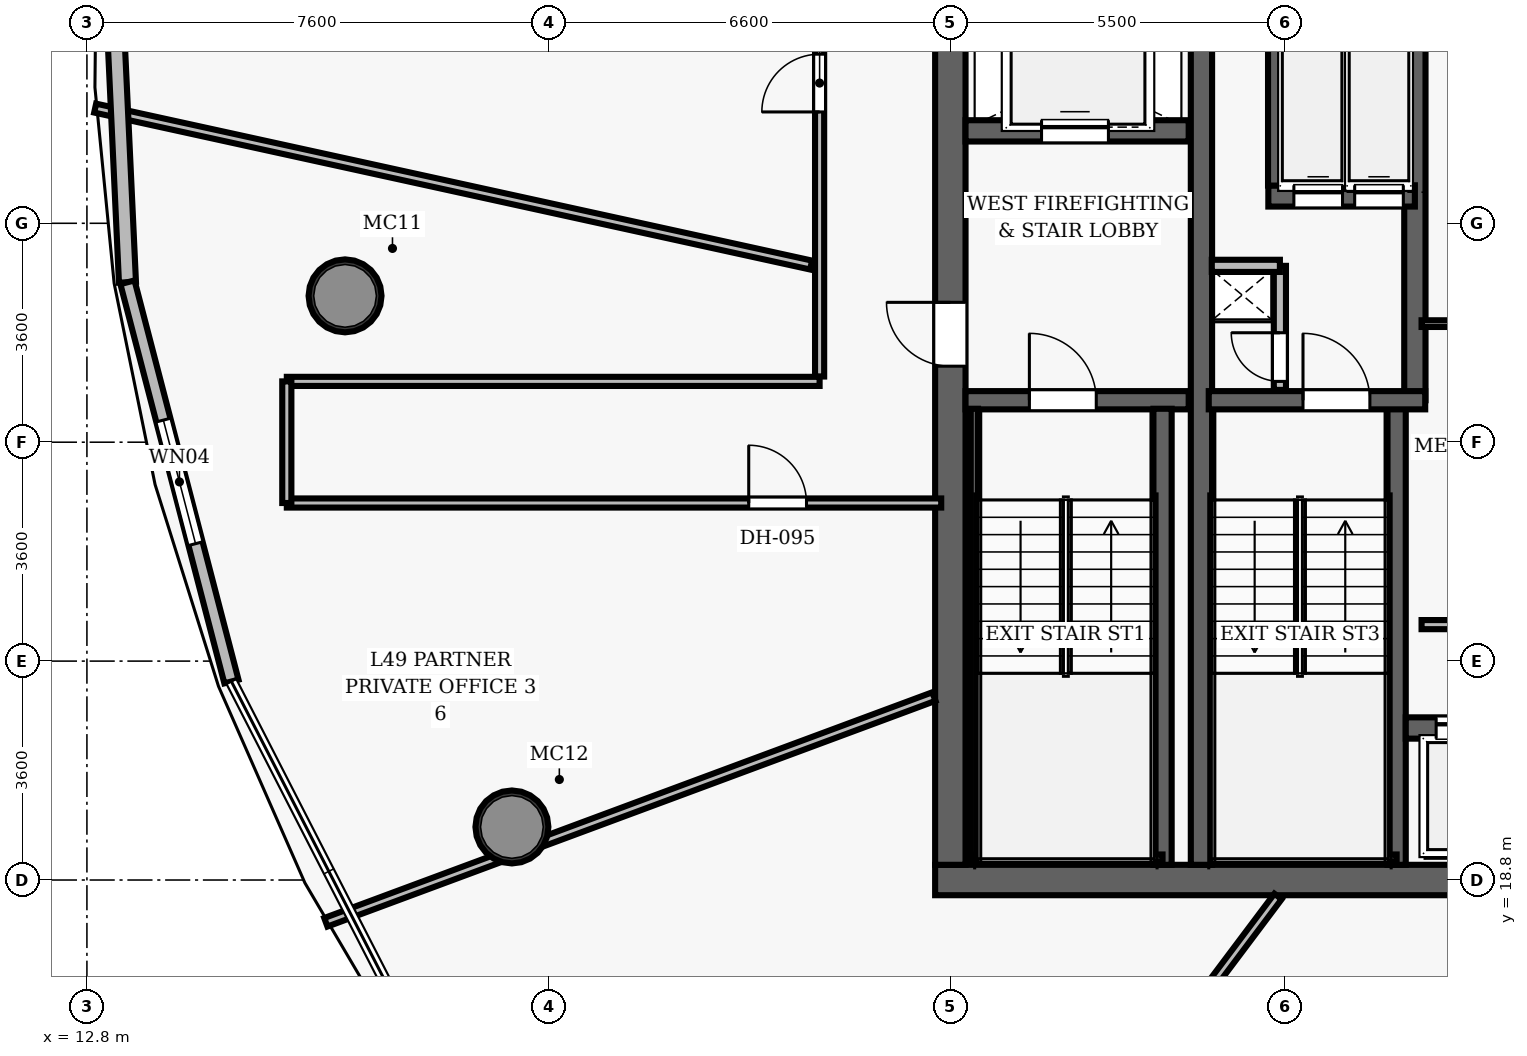
"""IFC4 building model, lengths in metres.
Left out: names, types, materials, properties, quantities, classifications, styles, units other than length and angle.
Written with IfcOpenShell. Run it as: python <this file> out.ifc"""

import sys

from ifc_helpers import new_model, si_unit, direction, frame, frame_2d, origin, origin_2d, place, context, subcontext, project, spatial, rectangle, hollow_circle, extrude, element, fill, save


model = new_model("IFC4")
c1 = context("Model", 3, precision=1e-05, world=origin(), true_north=direction((0.0, 1.0)))
c2 = subcontext(c1, "Body", "Model", "MODEL_VIEW")
j1 = project(units=[si_unit("LENGTHUNIT", "METRE"), si_unit("PLANEANGLEUNIT", "RADIAN")], contexts=[c1])
p1 = place(None, origin())
s1 = spatial("IfcSite", under=j1, at=p1, CompositionType="ELEMENT")
p2 = place(p1, origin())
s2 = spatial("IfcBuilding", under=s1, at=p2, CompositionType="ELEMENT")
p3 = place(p2, frame((0.0, 0.0, 194.3)))
s3 = spatial("IfcBuildingStorey", under=s2, at=p3, CompositionType="ELEMENT", Elevation=194.3)
p4 = place(p3, frame((26.75, 18.8, 0.0), z_axis=(0.0, 0.0, 1.0), x_axis=(1.0, 0.0, 0.0)))
e1 = element("IfcWall", 1, at=p4, inside=s3, PredefinedType="SHEAR", context=c2, shape_type="SweptSolid", body=[
    extrude(rectangle(XDim=22.5, YDim=0.5, at=frame_2d((11.25, 0.0))), origin(), (0.0, 0.0, 1.0), 3.85),
])
p5 = place(p4, frame((14.47, 0.0, 0.0)))
e2 = element("IfcOpeningElement", 2, at=p5, cuts=e1, PredefinedType="OPENING", context=c2, shape_type="SweptSolid", body=[
    extrude(rectangle(XDim=1.05, YDim=2.15, at=frame_2d((0.525, 1.075))), frame((0.0, 0.26, 0.0), z_axis=(0.0, -1.0, 0.0), x_axis=(1.0, 0.0, 0.0)), (0.0, 0.0, 1.0), 0.52),
])
p6 = place(p3, frame((27.0, 19.05, 0.0), z_axis=(0.0, 0.0, 1.0), x_axis=(0.0, 1.0, 0.0)))
e3 = element("IfcWall", 3, at=p6, inside=s3, PredefinedType="SHEAR", context=c2, shape_type="SweptSolid", body=[
    extrude(rectangle(XDim=13.9, YDim=0.5, at=frame_2d((6.95, 0.0))), origin(), (0.0, 0.0, 1.0), 3.85),
])
p7 = place(p6, frame((8.2, 0.0, 0.0)))
e4 = element("IfcOpeningElement", 4, at=p7, cuts=e3, PredefinedType="OPENING", context=c2, shape_type="SweptSolid", body=[
    extrude(rectangle(XDim=1.05, YDim=2.15, at=frame_2d((0.525, 1.075))), frame((0.0, 0.26, 0.0), z_axis=(0.0, -1.0, 0.0), x_axis=(1.0, 0.0, 0.0)), (0.0, 0.0, 1.0), 0.52),
])
p8 = place(p3, frame((31.13, 19.05, 0.0), z_axis=(0.0, 0.0, 1.0), x_axis=(0.0, 1.0, 0.0)))
e5 = element("IfcWall", 5, at=p8, inside=s3, PredefinedType="SHEAR", context=c2, shape_type="SweptSolid", body=[
    extrude(rectangle(XDim=13.9, YDim=0.35, at=frame_2d((6.95, 0.0))), origin(), (0.0, 0.0, 1.0), 3.85),
])
for number, where, z_axis, x_axis in (
    (6, (17.045, 28.406, 0.0), (0.0, 0.0, 1.0), (1.0, 0.0, 0.0)),
    (7, (19.79, 19.673, 0.0), (0.0, 0.0, 1.0), (1.0, 0.0, 0.0)),
):
    element("IfcColumn", number, at=place(p3, frame(where, z_axis=z_axis, x_axis=x_axis)), inside=s3, PredefinedType="COLUMN", context=c2, shape_type="SweptSolid", body=[
        extrude(hollow_circle(Radius=0.6, WallThickness=0.05, at=origin_2d()), origin(), (0.0, 0.0, 1.0), 3.85),
    ])
p9 = place(p3, frame((27.25, 26.69, 0.0), z_axis=(0.0, 0.0, 1.0), x_axis=(1.0, 0.0, 0.0)))
e8 = element("IfcWall", 8, at=p9, inside=s3, PredefinedType="SHEAR", context=c2, shape_type="SweptSolid", body=[
    extrude(rectangle(XDim=3.67, YDim=0.3, at=frame_2d((1.835, 0.0))), origin(), (0.0, 0.0, 1.0), 3.85),
])
p10 = place(p9, frame((1.05, 0.0, 0.0)))
e9 = element("IfcOpeningElement", 9, at=p10, cuts=e8, PredefinedType="OPENING", context=c2, shape_type="SweptSolid", body=[
    extrude(rectangle(XDim=1.1, YDim=2.15, at=frame_2d((0.55, 1.075))), frame((0.0, 0.16, 0.0), z_axis=(0.0, -1.0, 0.0), x_axis=(1.0, 0.0, 0.0)), (0.0, 0.0, 1.0), 0.32),
])
p11 = place(p3, frame((30.49, 19.05, 0.0), z_axis=(0.0, 0.0, 1.0), x_axis=(0.0, 1.0, 0.0)))
e10 = element("IfcWall", 10, at=p11, inside=s3, PredefinedType="SHEAR", context=c2, shape_type="SweptSolid", body=[
    extrude(rectangle(XDim=7.5, YDim=0.3, at=frame_2d((3.75, 0.0))), origin(), (0.0, 0.0, 1.0), 3.85),
])
p12 = place(p3, frame((27.395, 19.1, 0.0), z_axis=(0.0, 0.0, 1.0), x_axis=(0.0, 1.0, 0.0)))
e11 = element("IfcWall", 11, at=p12, inside=s3, PredefinedType="SHEAR", context=c2, shape_type="SweptSolid", body=[
    extrude(rectangle(XDim=7.45, YDim=0.12, at=frame_2d((3.725, 0.0))), origin(), (0.0, 0.0, 1.0), 3.85),
])
p13 = place(p3, frame((27.395, 19.16, 0.0), z_axis=(0.0, 0.0, 1.0), x_axis=(1.0, 0.0, 0.0)))
e12 = element("IfcWall", 12, at=p13, inside=s3, PredefinedType="SHEAR", context=c2, shape_type="SweptSolid", body=[
    extrude(rectangle(XDim=3.095, YDim=0.12, at=frame_2d((1.547, 0.0))), origin(), (0.0, 0.0, 1.0), 3.85),
])
p14 = place(p3, frame((27.25, 31.12, 0.0), z_axis=(0.0, 0.0, 1.0), x_axis=(1.0, 0.0, 0.0)))
e13 = element("IfcWall", 13, at=p14, inside=s3, PredefinedType="SHEAR", context=c2, shape_type="SweptSolid", body=[
    extrude(rectangle(XDim=3.67, YDim=0.35, at=frame_2d((1.835, 0.0))), origin(), (0.0, 0.0, 1.0), 3.035),
])
p15 = place(p14, frame((1.25, 0.0, 0.0)))
e14 = element("IfcOpeningElement", 14, at=p15, cuts=e13, PredefinedType="OPENING", context=c2, shape_type="SweptSolid", body=[
    extrude(rectangle(XDim=1.1, YDim=2.15, at=frame_2d((0.55, 1.075))), frame((0.0, 0.185, 0.0), z_axis=(0.0, -1.0, 0.0), x_axis=(1.0, 0.0, 0.0)), (0.0, 0.0, 1.0), 0.37),
])
p16 = place(p3, frame((34.34, 19.05, 0.0), z_axis=(0.0, 0.0, 1.0), x_axis=(0.0, 1.0, 0.0)))
e15 = element("IfcWall", 15, at=p16, inside=s3, PredefinedType="SHEAR", context=c2, shape_type="SweptSolid", body=[
    extrude(rectangle(XDim=7.5, YDim=0.3, at=frame_2d((3.75, 0.0))), origin(), (0.0, 0.0, 1.0), 3.85),
])
p17 = place(p3, frame((34.64, 26.69, 0.0), z_axis=(0.0, 0.0, 1.0), x_axis=(0.0, 1.0, 0.0)))
e16 = element("IfcWall", 16, at=p17, inside=s3, PredefinedType="SHEAR", context=c2, shape_type="SweptSolid", body=[
    extrude(rectangle(XDim=6.26, YDim=0.35, at=frame_2d((3.13, 0.0))), origin(), (0.0, 0.0, 1.0), 3.85),
])
p18 = place(p3, frame((31.25, 26.69, 0.0), z_axis=(0.0, 0.0, 1.0), x_axis=(1.0, 0.0, 0.0)))
e17 = element("IfcWall", 17, at=p18, inside=s3, PredefinedType="SHEAR", context=c2, shape_type="SweptSolid", body=[
    extrude(rectangle(XDim=3.56, YDim=0.3, at=frame_2d((1.78, 0.0))), origin(), (0.0, 0.0, 1.0), 3.85),
])
p19 = place(p18, frame((1.55, 0.0, 0.0)))
e18 = element("IfcOpeningElement", 18, at=p19, cuts=e17, PredefinedType="OPENING", context=c2, shape_type="SweptSolid", body=[
    extrude(rectangle(XDim=1.1, YDim=2.15, at=frame_2d((0.55, 1.075))), frame((0.0, 0.16, 0.0), z_axis=(0.0, -1.0, 0.0), x_axis=(1.0, 0.0, 0.0)), (0.0, 0.0, 1.0), 0.32),
])
p20 = place(p3, frame((31.3, 19.16, 0.0), z_axis=(0.0, 0.0, 1.0), x_axis=(1.0, 0.0, 0.0)))
e19 = element("IfcWall", 19, at=p20, inside=s3, PredefinedType="SHEAR", context=c2, shape_type="SweptSolid", body=[
    extrude(rectangle(XDim=3.04, YDim=0.12, at=frame_2d((1.52, 0.0))), origin(), (0.0, 0.0, 1.0), 3.85),
])
p21 = place(p3, frame((32.23, 30.05, 0.0), z_axis=(0.0, 0.0, 1.0), x_axis=(1.0, 0.0, 0.0)))
e20 = element("IfcWall", 20, at=p21, inside=s3, PredefinedType="SHEAR", context=c2, shape_type="SweptSolid", body=[
    extrude(rectangle(XDim=2.41, YDim=0.35, at=frame_2d((1.205, 0.0))), origin(), (0.0, 0.0, 1.0), 3.035),
])
p22 = place(p21, frame((0.42, 0.0, 0.0)))
e21 = element("IfcOpeningElement", 21, at=p22, cuts=e20, PredefinedType="OPENING", context=c2, shape_type="SweptSolid", body=[
    extrude(rectangle(XDim=0.8, YDim=2.15, at=frame_2d((0.4, 1.075))), frame((0.0, 0.185, 0.0), z_axis=(0.0, -1.0, 0.0), x_axis=(1.0, 0.0, 0.0)), (0.0, 0.0, 1.0), 0.37),
])
p23 = place(p21, frame((1.42, 0.0, 0.0)))
e22 = element("IfcOpeningElement", 22, at=p23, cuts=e20, PredefinedType="OPENING", context=c2, shape_type="SweptSolid", body=[
    extrude(rectangle(XDim=0.8, YDim=2.15, at=frame_2d((0.4, 1.075))), frame((0.0, 0.185, 0.0), z_axis=(0.0, -1.0, 0.0), x_axis=(1.0, 0.0, 0.0)), (0.0, 0.0, 1.0), 0.37),
])
p24 = place(p3, frame((32.4, 30.22, 0.0), z_axis=(0.0, 0.0, 1.0), x_axis=(0.0, 1.0, 0.0)))
e23 = element("IfcWall", 23, at=p24, inside=s3, PredefinedType="SHEAR", context=c2, shape_type="SweptSolid", body=[
    extrude(rectangle(XDim=2.73, YDim=0.35, at=frame_2d((1.365, 0.0))), origin(), (0.0, 0.0, 1.0), 3.035),
])
p25 = place(p3, frame((32.42, 26.86, 0.0), z_axis=(0.0, 0.0, 1.0), x_axis=(0.0, 1.0, 0.0)))
e24 = element("IfcWall", 24, at=p25, inside=s3, PredefinedType="PARTITIONING", context=c2, shape_type="SweptSolid", body=[
    extrude(rectangle(XDim=2.04, YDim=0.2, at=frame_2d((1.02, 0.0))), origin(), (0.0, 0.0, 1.0), 3.035),
])
p26 = place(p25, frame((0.14, 0.0, 0.0)))
e25 = element("IfcOpeningElement", 25, at=p26, cuts=e24, PredefinedType="OPENING", context=c2, shape_type="SweptSolid", body=[
    extrude(rectangle(XDim=0.8, YDim=2.05, at=frame_2d((0.4, 1.025))), frame((0.0, 0.11, 0.0), z_axis=(0.0, -1.0, 0.0), x_axis=(1.0, 0.0, 0.0)), (0.0, 0.0, 1.0), 0.22),
])
p27 = place(p3, frame((31.3, 28.9, 0.0), z_axis=(0.0, 0.0, 1.0), x_axis=(1.0, 0.0, 0.0)))
e26 = element("IfcWall", 26, at=p27, inside=s3, PredefinedType="PARTITIONING", context=c2, shape_type="SweptSolid", body=[
    extrude(rectangle(XDim=1.12, YDim=0.2, at=frame_2d((0.56, 0.0))), origin(), (0.0, 0.0, 1.0), 3.035),
])
p28 = place(p3, frame((34.49, 21.3, 0.0), z_axis=(0.0, 0.0, 1.0), x_axis=(1.0, 0.0, 0.0)))
e27 = element("IfcWall", 27, at=p28, inside=s3, PredefinedType="SHEAR", context=c2, shape_type="SweptSolid", body=[
    extrude(rectangle(XDim=6.68, YDim=0.35, at=frame_2d((3.34, 0.0))), origin(), (0.0, 0.0, 1.0), 3.035),
])
p29 = place(p28, frame((0.5, 0.0, 0.0)))
e28 = element("IfcOpeningElement", 28, at=p29, cuts=e27, PredefinedType="OPENING", context=c2, shape_type="SweptSolid", body=[
    extrude(rectangle(XDim=0.9, YDim=2.15, at=frame_2d((0.45, 1.075))), frame((0.0, 0.185, 0.0), z_axis=(0.0, -1.0, 0.0), x_axis=(1.0, 0.0, 0.0)), (0.0, 0.0, 1.0), 0.37),
])
p30 = place(p28, frame((2.58, 0.0, 0.0)))
e29 = element("IfcOpeningElement", 29, at=p30, cuts=e27, PredefinedType="OPENING", context=c2, shape_type="SweptSolid", body=[
    extrude(rectangle(XDim=0.9, YDim=2.15, at=frame_2d((0.45, 1.075))), frame((0.0, 0.185, 0.0), z_axis=(0.0, -1.0, 0.0), x_axis=(1.0, 0.0, 0.0)), (0.0, 0.0, 1.0), 0.37),
])
p31 = place(p28, frame((4.66, 0.0, 0.0)))
e30 = element("IfcOpeningElement", 30, at=p31, cuts=e27, PredefinedType="OPENING", context=c2, shape_type="SweptSolid", body=[
    extrude(rectangle(XDim=0.9, YDim=2.15, at=frame_2d((0.45, 1.075))), frame((0.0, 0.185, 0.0), z_axis=(0.0, -1.0, 0.0), x_axis=(1.0, 0.0, 0.0)), (0.0, 0.0, 1.0), 0.37),
])
p32 = place(p3, frame((34.75, 23.0, 0.0), z_axis=(0.0, 0.0, 1.0), x_axis=(1.0, 0.0, 0.0)))
e31 = element("IfcWall", 31, at=p32, inside=s3, PredefinedType="PARTITIONING", context=c2, shape_type="SweptSolid", body=[
    extrude(rectangle(XDim=6.25, YDim=0.15, at=frame_2d((3.125, 0.0))), origin(), (0.0, 0.0, 1.0), 3.035),
])
p33 = place(p3, frame((34.75, 27.95, 0.0), z_axis=(0.0, 0.0, 1.0), x_axis=(1.0, 0.0, 0.0)))
e32 = element("IfcWall", 32, at=p33, inside=s3, PredefinedType="PARTITIONING", context=c2, shape_type="SweptSolid", body=[
    extrude(rectangle(XDim=6.25, YDim=0.11, at=frame_2d((3.125, 0.0))), origin(), (0.0, 0.0, 1.0), 3.035),
])
p34 = place(p3, frame((24.85, 27.08, 0.0), z_axis=(0.0, 0.0, 1.0), x_axis=(0.0, 1.0, 0.0)))
e33 = element("IfcWall", 33, at=p34, inside=s3, PredefinedType="PARTITIONING", context=c2, shape_type="SweptSolid", body=[
    extrude(rectangle(XDim=8.12, YDim=0.15, at=frame_2d((4.06, 0.0))), origin(), (0.0, 0.0, 1.0), 3.035),
])
p35 = place(p34, frame((4.351, 0.0, 0.0)))
e34 = element("IfcOpeningElement", 34, at=p35, cuts=e33, PredefinedType="OPENING", context=c2, shape_type="SweptSolid", body=[
    extrude(rectangle(XDim=0.95, YDim=2.15, at=frame_2d((0.475, 1.075))), frame((0.0, 0.085, 0.0), z_axis=(0.0, -1.0, 0.0), x_axis=(1.0, 0.0, 0.0)), (0.0, 0.0, 1.0), 0.17),
])
p36 = place(p3, frame((16.088, 27.0, 0.0), z_axis=(0.0, 0.0, 1.0), x_axis=(1.0, 0.0, 0.0)))
e35 = element("IfcWall", 35, at=p36, inside=s3, PredefinedType="PARTITIONING", context=c2, shape_type="SweptSolid", body=[
    extrude(rectangle(XDim=8.762, YDim=0.15, at=frame_2d((4.381, 0.0))), origin(), (0.0, 0.0, 1.0), 3.035),
])
p37 = place(p3, frame((16.088, 25.0, 0.0), z_axis=(0.0, 0.0, 1.0), x_axis=(1.0, 0.0, 0.0)))
e36 = element("IfcWall", 36, at=p37, inside=s3, PredefinedType="PARTITIONING", context=c2, shape_type="SweptSolid", body=[
    extrude(rectangle(XDim=10.762, YDim=0.15, at=frame_2d((5.381, 0.0))), origin(), (0.0, 0.0, 1.0), 3.035),
])
p38 = place(p37, frame((7.597, 0.0, 0.0)))
e37 = element("IfcOpeningElement", 37, at=p38, cuts=e36, PredefinedType="OPENING", context=c2, shape_type="SweptSolid", body=[
    extrude(rectangle(XDim=0.95, YDim=2.15, at=frame_2d((0.475, 1.075))), frame((0.0, 0.085, 0.0), z_axis=(0.0, -1.0, 0.0), x_axis=(1.0, 0.0, 0.0)), (0.0, 0.0, 1.0), 0.17),
])
p39 = place(p3, frame((16.088, 25.0, 0.0), z_axis=(0.0, 0.0, 1.0), x_axis=(0.0, 1.0, 0.0)))
e38 = element("IfcWall", 38, at=p39, inside=s3, PredefinedType="PARTITIONING", context=c2, shape_type="SweptSolid", body=[
    extrude(rectangle(XDim=2.0, YDim=0.15, at=frame_2d((1.0, 0.0))), origin(), (0.0, 0.0, 1.0), 3.035),
])
p40 = place(p3, frame((24.71, 28.913, 0.0), z_axis=(0.0, 0.0, 1.0), x_axis=(-0.976806374433, 0.214124512534, 0.0)))
e39 = element("IfcWall", 39, at=p40, inside=s3, PredefinedType="PARTITIONING", context=c2, shape_type="SweptSolid", body=[
    extrude(rectangle(XDim=12.054, YDim=0.15, at=frame_2d((6.027, 0.0))), origin(), (0.0, 0.0, 1.0), 3.035),
])
p41 = place(p3, frame((26.73, 21.817, 0.0), z_axis=(0.0, 0.0, 1.0), x_axis=(-0.937498671768, -0.347988851018, 0.0)))
e40 = element("IfcWall", 40, at=p41, inside=s3, PredefinedType="PARTITIONING", context=c2, shape_type="SweptSolid", body=[
    extrude(rectangle(XDim=10.667, YDim=0.15, at=frame_2d((5.334, 0.0))), origin(), (0.0, 0.0, 1.0), 3.035),
])
p42 = place(p3, frame((32.389, 18.53, 0.0), z_axis=(0.0, 0.0, 1.0), x_axis=(-0.600541177599, -0.799593830646, 0.0)))
e41 = element("IfcWall", 41, at=p42, inside=s3, PredefinedType="PARTITIONING", context=c2, shape_type="SweptSolid", body=[
    extrude(rectangle(XDim=12.268, YDim=0.15, at=frame_2d((6.134, 0.0))), origin(), (0.0, 0.0, 1.0), 3.035),
])
p43 = place(p3, frame((13.467, 28.63, 0.0), z_axis=(0.0, 0.0, 1.0), x_axis=(-0.046581504833, 0.998914492541, 0.0)))
e42 = element("IfcWall", 42, at=p43, inside=s3, PredefinedType="SOLIDWALL", context=c2, shape_type="SweptSolid", body=[
    extrude(rectangle(XDim=6.227, YDim=0.28, at=frame_2d((3.113, 0.0))), origin(), (0.0, 0.0, 1.0), 3.62),
])
p44 = place(p3, frame((15.177, 22.064, 0.0), z_axis=(0.0, 0.0, 1.0), x_axis=(-0.252007306882, 0.967725331526, 0.0)))
e43 = element("IfcWall", 43, at=p44, inside=s3, PredefinedType="SOLIDWALL", context=c2, shape_type="SweptSolid", body=[
    extrude(rectangle(XDim=6.784, YDim=0.24, at=frame_2d((3.392, 0.0))), origin(), (0.0, 0.0, 1.0), 3.62),
])
p45 = place(p44, frame((2.342, 0.0, 0.85)))
e44 = element("IfcOpeningElement", 44, at=p45, cuts=e43, PredefinedType="OPENING", context=c2, shape_type="SweptSolid", body=[
    extrude(rectangle(XDim=2.1, YDim=1.8, at=frame_2d((1.05, 0.9))), frame((0.0, 0.13, 0.0), z_axis=(0.0, -1.0, 0.0), x_axis=(1.0, 0.0, 0.0)), (0.0, 0.0, 1.0), 0.26),
])
p46 = place(p10, origin())
e45 = element("IfcDoor", 45, at=p46, inside=s3, OperationType="SINGLE_SWING_LEFT", PredefinedType="DOOR", context=c2, shape_type="SweptSolid", body=[
    extrude(rectangle(XDim=1.1, YDim=2.15, at=frame_2d((0.55, 1.075))), frame((0.0, 0.025, 0.0), z_axis=(0.0, -1.0, 0.0), x_axis=(1.0, 0.0, 0.0)), (0.0, 0.0, 1.0), 0.05),
])
fill(e9, e45)
p47 = place(p7, origin())
e46 = element("IfcDoor", 46, at=p47, inside=s3, OperationType="SINGLE_SWING_RIGHT", PredefinedType="DOOR", context=c2, shape_type="SweptSolid", body=[
    extrude(rectangle(XDim=1.05, YDim=2.15, at=frame_2d((0.525, 1.075))), frame((0.0, 0.025, 0.0), z_axis=(0.0, -1.0, 0.0), x_axis=(1.0, 0.0, 0.0)), (0.0, 0.0, 1.0), 0.05),
])
fill(e4, e46)
p48 = place(p19, origin())
e47 = element("IfcDoor", 47, at=p48, inside=s3, OperationType="SINGLE_SWING_LEFT", PredefinedType="DOOR", context=c2, shape_type="SweptSolid", body=[
    extrude(rectangle(XDim=1.1, YDim=2.15, at=frame_2d((0.55, 1.075))), frame((0.0, 0.025, 0.0), z_axis=(0.0, -1.0, 0.0), x_axis=(1.0, 0.0, 0.0)), (0.0, 0.0, 1.0), 0.05),
])
fill(e18, e47)
p49 = place(p26, origin())
e48 = element("IfcDoor", 48, at=p49, inside=s3, OperationType="SINGLE_SWING_RIGHT", PredefinedType="DOOR", context=c2, shape_type="SweptSolid", body=[
    extrude(rectangle(XDim=0.8, YDim=2.05, at=frame_2d((0.4, 1.025))), frame((0.0, 0.025, 0.0), z_axis=(0.0, -1.0, 0.0), x_axis=(1.0, 0.0, 0.0)), (0.0, 0.0, 1.0), 0.05),
])
fill(e25, e48)
p50 = place(p35, origin())
e49 = element("IfcDoor", 49, at=p50, inside=s3, OperationType="SINGLE_SWING_LEFT", PredefinedType="DOOR", context=c2, shape_type="SweptSolid", body=[
    extrude(rectangle(XDim=0.95, YDim=2.15, at=frame_2d((0.475, 1.075))), frame((0.0, 0.025, 0.0), z_axis=(0.0, -1.0, 0.0), x_axis=(1.0, 0.0, 0.0)), (0.0, 0.0, 1.0), 0.05),
])
fill(e34, e49)
p51 = place(p38, origin())
e50 = element("IfcDoor", 50, at=p51, inside=s3, OperationType="SINGLE_SWING_LEFT", PredefinedType="DOOR", context=c2, shape_type="SweptSolid", body=[
    extrude(rectangle(XDim=0.95, YDim=2.15, at=frame_2d((0.475, 1.075))), frame((0.0, 0.025, 0.0), z_axis=(0.0, -1.0, 0.0), x_axis=(1.0, 0.0, 0.0)), (0.0, 0.0, 1.0), 0.05),
])
fill(e37, e50)
p52 = place(p29, origin())
e51 = element("IfcDoor", 51, at=p52, inside=s3, OperationType="SLIDING_TO_LEFT", PredefinedType="DOOR", context=c2, shape_type="SweptSolid", body=[
    extrude(rectangle(XDim=0.9, YDim=2.15, at=frame_2d((0.45, 1.075))), frame((0.0, 0.025, 0.0), z_axis=(0.0, -1.0, 0.0), x_axis=(1.0, 0.0, 0.0)), (0.0, 0.0, 1.0), 0.05),
])
fill(e28, e51)
p53 = place(p15, origin())
e52 = element("IfcDoor", 52, at=p53, inside=s3, OperationType="SLIDING_TO_LEFT", PredefinedType="DOOR", context=c2, shape_type="SweptSolid", body=[
    extrude(rectangle(XDim=1.1, YDim=2.15, at=frame_2d((0.55, 1.075))), frame((0.0, 0.025, 0.0), z_axis=(0.0, -1.0, 0.0), x_axis=(1.0, 0.0, 0.0)), (0.0, 0.0, 1.0), 0.05),
])
fill(e14, e52)
p54 = place(p22, origin())
e53 = element("IfcDoor", 53, at=p54, inside=s3, OperationType="SLIDING_TO_LEFT", PredefinedType="DOOR", context=c2, shape_type="SweptSolid", body=[
    extrude(rectangle(XDim=0.8, YDim=2.15, at=frame_2d((0.4, 1.075))), frame((0.0, 0.025, 0.0), z_axis=(0.0, -1.0, 0.0), x_axis=(1.0, 0.0, 0.0)), (0.0, 0.0, 1.0), 0.05),
])
fill(e21, e53)
p55 = place(p23, origin())
e54 = element("IfcDoor", 54, at=p55, inside=s3, OperationType="SLIDING_TO_LEFT", PredefinedType="DOOR", context=c2, shape_type="SweptSolid", body=[
    extrude(rectangle(XDim=0.8, YDim=2.15, at=frame_2d((0.4, 1.075))), frame((0.0, 0.025, 0.0), z_axis=(0.0, -1.0, 0.0), x_axis=(1.0, 0.0, 0.0)), (0.0, 0.0, 1.0), 0.05),
])
fill(e22, e54)
p56 = place(p45, origin())
e55 = element("IfcWindow", 55, at=p56, inside=s3, PartitioningType="SINGLE_PANEL", PredefinedType="WINDOW", context=c2, shape_type="SweptSolid", body=[
    extrude(rectangle(XDim=2.1, YDim=1.8, at=frame_2d((1.05, 0.9))), frame((0.0, 0.03, 0.0), z_axis=(0.0, -1.0, 0.0), x_axis=(1.0, 0.0, 0.0)), (0.0, 0.0, 1.0), 0.06),
])
fill(e44, e55)
save(model, sys.argv[1])
